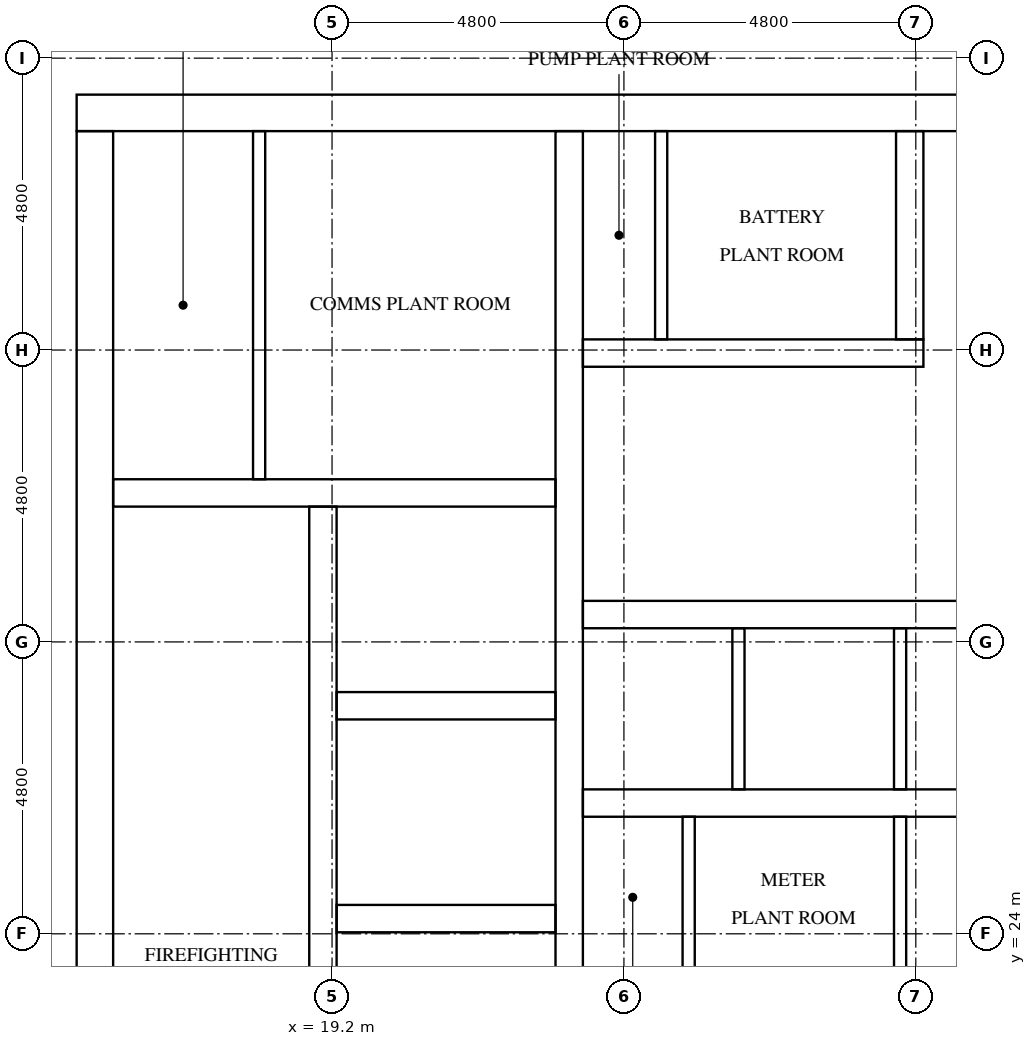
"""IFC4 building model, lengths in metres.
Left out: names, types, materials, properties, quantities, classifications, styles, units other than length and angle.
Written with IfcOpenShell. Run it as: python <this file> out.ifc"""

import sys

from ifc_helpers import new_model, si_unit, direction, frame, frame_2d, origin, place, context, subcontext, project, spatial, rectangle, extrude, element, fill, save


model = new_model("IFC4")
c1 = context("Model", 3, precision=1e-05, world=origin(), true_north=direction((0.0, 1.0)))
c2 = subcontext(c1, "Body", "Model", "MODEL_VIEW")
j1 = project(units=[si_unit("LENGTHUNIT", "METRE"), si_unit("PLANEANGLEUNIT", "RADIAN")], contexts=[c1])
p1 = place(None, origin())
s1 = spatial("IfcSite", under=j1, at=p1, CompositionType="ELEMENT")
p2 = place(p1, origin())
s2 = spatial("IfcBuilding", under=s1, at=p2, CompositionType="ELEMENT")
p3 = place(p2, frame((0.0, 0.0, 233.3)))
s3 = spatial("IfcBuildingStorey", under=s2, at=p3, CompositionType="ELEMENT", Elevation=233.3)
p4 = place(p3, frame((15.0, 37.5, 0.0), z_axis=(0.0, 0.0, 1.0), x_axis=(1.0, 0.0, 0.0)))
e1 = element("IfcWall", 1, at=p4, inside=s3, PredefinedType="SHEAR", context=c2, shape_type="SweptSolid", body=[
    extrude(rectangle(XDim=32.4, YDim=0.6, at=frame_2d((16.2, 0.0))), origin(), (0.0, 0.0, 1.0), 5.1),
])
p5 = place(p4, frame((15.3, 0.0, 0.0)))
e2 = element("IfcOpeningElement", 2, at=p5, cuts=e1, PredefinedType="OPENING", context=c2, shape_type="SweptSolid", body=[
    extrude(rectangle(XDim=1.8, YDim=2.1, at=frame_2d((0.9, 1.05))), frame((0.0, 0.31, 0.0), z_axis=(0.0, -1.0, 0.0), x_axis=(1.0, 0.0, 0.0)), (0.0, 0.0, 1.0), 0.62),
])
p6 = place(p4, frame((1.25, 0.0, 0.0)))
e3 = element("IfcOpeningElement", 3, at=p6, cuts=e1, PredefinedType="OPENING", context=c2, shape_type="SweptSolid", body=[
    extrude(rectangle(XDim=1.0, YDim=2.1, at=frame_2d((0.5, 1.05))), frame((0.0, 0.31, 0.0), z_axis=(0.0, -1.0, 0.0), x_axis=(1.0, 0.0, 0.0)), (0.0, 0.0, 1.0), 0.62),
])
p7 = place(p4, frame((4.988, 0.0, 0.0)))
e4 = element("IfcOpeningElement", 4, at=p7, cuts=e1, PredefinedType="OPENING", context=c2, shape_type="SweptSolid", body=[
    extrude(rectangle(XDim=1.0, YDim=2.1, at=frame_2d((0.5, 1.05))), frame((0.0, 0.31, 0.0), z_axis=(0.0, -1.0, 0.0), x_axis=(1.0, 0.0, 0.0)), (0.0, 0.0, 1.0), 0.62),
])
p8 = place(p3, frame((15.3, 15.6, 0.0), z_axis=(0.0, 0.0, 1.0), x_axis=(0.0, 1.0, 0.0)))
e5 = element("IfcWall", 5, at=p8, inside=s3, PredefinedType="SHEAR", context=c2, shape_type="SweptSolid", body=[
    extrude(rectangle(XDim=21.6, YDim=0.6, at=frame_2d((10.8, 0.0))), origin(), (0.0, 0.0, 1.0), 5.1),
])
p9 = place(p8, frame((5.16, 0.0, 0.0)))
e6 = element("IfcOpeningElement", 6, at=p9, cuts=e5, PredefinedType="OPENING", context=c2, shape_type="SweptSolid", body=[
    extrude(rectangle(XDim=1.2, YDim=2.1, at=frame_2d((0.6, 1.05))), frame((0.0, 0.31, 0.0), z_axis=(0.0, -1.0, 0.0), x_axis=(1.0, 0.0, 0.0)), (0.0, 0.0, 1.0), 0.62),
])
p10 = place(p3, frame((19.05, 15.6, 0.0), z_axis=(0.0, 0.0, 1.0), x_axis=(0.0, 1.0, 0.0)))
e7 = element("IfcWall", 7, at=p10, inside=s3, PredefinedType="SHEAR", context=c2, shape_type="SweptSolid", body=[
    extrude(rectangle(XDim=15.425, YDim=0.45, at=frame_2d((7.712, 0.0))), origin(), (0.0, 0.0, 1.0), 5.1),
])
p11 = place(p10, frame((9.85, 0.0, 0.0)))
e8 = element("IfcOpeningElement", 8, at=p11, cuts=e7, PredefinedType="OPENING", context=c2, shape_type="SweptSolid", body=[
    extrude(rectangle(XDim=1.1, YDim=2.1, at=frame_2d((0.55, 1.05))), frame((0.0, 0.235, 0.0), z_axis=(0.0, -1.0, 0.0), x_axis=(1.0, 0.0, 0.0)), (0.0, 0.0, 1.0), 0.47),
])
p12 = place(p10, frame((13.35, 0.0, 0.0)))
e9 = element("IfcOpeningElement", 9, at=p12, cuts=e7, PredefinedType="OPENING", context=c2, shape_type="SweptSolid", body=[
    extrude(rectangle(XDim=1.1, YDim=2.1, at=frame_2d((0.55, 1.05))), frame((0.0, 0.235, 0.0), z_axis=(0.0, -1.0, 0.0), x_axis=(1.0, 0.0, 0.0)), (0.0, 0.0, 1.0), 0.47),
])
p13 = place(p10, frame((0.6, 0.0, 0.0)))
e10 = element("IfcOpeningElement", 10, at=p13, cuts=e7, PredefinedType="OPENING", context=c2, shape_type="SweptSolid", body=[
    extrude(rectangle(XDim=1.2, YDim=2.1, at=frame_2d((0.6, 1.05))), frame((0.0, 0.235, 0.0), z_axis=(0.0, -1.0, 0.0), x_axis=(1.0, 0.0, 0.0)), (0.0, 0.0, 1.0), 0.47),
])
p14 = place(p3, frame((23.1, 15.6, 0.0), z_axis=(0.0, 0.0, 1.0), x_axis=(0.0, 1.0, 0.0)))
e11 = element("IfcWall", 11, at=p14, inside=s3, PredefinedType="SHEAR", context=c2, shape_type="SweptSolid", body=[
    extrude(rectangle(XDim=21.6, YDim=0.45, at=frame_2d((10.8, 0.0))), origin(), (0.0, 0.0, 1.0), 5.1),
])
for number, where, z_axis, x_axis in (
    (12, (19.275, 24.25, 0.0), (0.0, 0.0, 1.0), (1.0, 0.0, 0.0)),
    (13, (19.275, 27.75, 0.0), (0.0, 0.0, 1.0), (1.0, 0.0, 0.0)),
):
    element("IfcWall", number, at=place(p3, frame(where, z_axis=z_axis, x_axis=x_axis)), inside=s3, PredefinedType="SHEAR", context=c2, shape_type="SweptSolid", body=[
        extrude(rectangle(XDim=3.6, YDim=0.45, at=frame_2d((1.8, 0.0))), origin(), (0.0, 0.0, 1.0), 5.1),
    ])
p15 = place(p3, frame((15.6, 31.25, 0.0), z_axis=(0.0, 0.0, 1.0), x_axis=(1.0, 0.0, 0.0)))
e14 = element("IfcWall", 14, at=p15, inside=s3, PredefinedType="SHEAR", context=c2, shape_type="SweptSolid", body=[
    extrude(rectangle(XDim=7.275, YDim=0.45, at=frame_2d((3.637, 0.0))), origin(), (0.0, 0.0, 1.0), 5.1),
])
p16 = place(p3, frame((23.325, 26.15, 0.0), z_axis=(0.0, 0.0, 1.0), x_axis=(1.0, 0.0, 0.0)))
e15 = element("IfcWall", 15, at=p16, inside=s3, PredefinedType="SHEAR", context=c2, shape_type="SweptSolid", body=[
    extrude(rectangle(XDim=15.75, YDim=0.45, at=frame_2d((7.875, 0.0))), origin(), (0.0, 0.0, 1.0), 5.1),
])
p17 = place(p3, frame((23.325, 29.25, 0.0), z_axis=(0.0, 0.0, 1.0), x_axis=(1.0, 0.0, 0.0)))
e16 = element("IfcWall", 16, at=p17, inside=s3, PredefinedType="SHEAR", context=c2, shape_type="SweptSolid", body=[
    extrude(rectangle(XDim=15.75, YDim=0.45, at=frame_2d((7.875, 0.0))), origin(), (0.0, 0.0, 1.0), 5.1),
])
p18 = place(p17, frame((0.679, 0.0, 0.0)))
e17 = element("IfcOpeningElement", 17, at=p18, cuts=e16, PredefinedType="OPENING", context=c2, shape_type="SweptSolid", body=[
    extrude(rectangle(XDim=1.1, YDim=2.1, at=frame_2d((0.55, 1.05))), frame((0.0, 0.235, 0.0), z_axis=(0.0, -1.0, 0.0), x_axis=(1.0, 0.0, 0.0)), (0.0, 0.0, 1.0), 0.47),
])
p19 = place(p17, frame((3.337, 0.0, 0.0)))
e18 = element("IfcOpeningElement", 18, at=p19, cuts=e16, PredefinedType="OPENING", context=c2, shape_type="SweptSolid", body=[
    extrude(rectangle(XDim=1.1, YDim=2.1, at=frame_2d((0.55, 1.05))), frame((0.0, 0.235, 0.0), z_axis=(0.0, -1.0, 0.0), x_axis=(1.0, 0.0, 0.0)), (0.0, 0.0, 1.0), 0.47),
])
p20 = place(p17, frame((5.996, 0.0, 0.0)))
e19 = element("IfcOpeningElement", 19, at=p20, cuts=e16, PredefinedType="OPENING", context=c2, shape_type="SweptSolid", body=[
    extrude(rectangle(XDim=1.1, YDim=2.1, at=frame_2d((0.55, 1.05))), frame((0.0, 0.235, 0.0), z_axis=(0.0, -1.0, 0.0), x_axis=(1.0, 0.0, 0.0)), (0.0, 0.0, 1.0), 0.47),
])
p21 = place(p17, frame((8.654, 0.0, 0.0)))
e20 = element("IfcOpeningElement", 20, at=p21, cuts=e16, PredefinedType="OPENING", context=c2, shape_type="SweptSolid", body=[
    extrude(rectangle(XDim=1.1, YDim=2.1, at=frame_2d((0.55, 1.05))), frame((0.0, 0.235, 0.0), z_axis=(0.0, -1.0, 0.0), x_axis=(1.0, 0.0, 0.0)), (0.0, 0.0, 1.0), 0.47),
])
p22 = place(p17, frame((11.312, 0.0, 0.0)))
e21 = element("IfcOpeningElement", 21, at=p22, cuts=e16, PredefinedType="OPENING", context=c2, shape_type="SweptSolid", body=[
    extrude(rectangle(XDim=1.1, YDim=2.1, at=frame_2d((0.55, 1.05))), frame((0.0, 0.235, 0.0), z_axis=(0.0, -1.0, 0.0), x_axis=(1.0, 0.0, 0.0)), (0.0, 0.0, 1.0), 0.47),
])
p23 = place(p17, frame((13.971, 0.0, 0.0)))
e22 = element("IfcOpeningElement", 22, at=p23, cuts=e16, PredefinedType="OPENING", context=c2, shape_type="SweptSolid", body=[
    extrude(rectangle(XDim=1.1, YDim=2.1, at=frame_2d((0.55, 1.05))), frame((0.0, 0.235, 0.0), z_axis=(0.0, -1.0, 0.0), x_axis=(1.0, 0.0, 0.0)), (0.0, 0.0, 1.0), 0.47),
])
p24 = place(p3, frame((23.325, 33.55, 0.0), z_axis=(0.0, 0.0, 1.0), x_axis=(1.0, 0.0, 0.0)))
e23 = element("IfcWall", 23, at=p24, inside=s3, PredefinedType="SHEAR", context=c2, shape_type="SweptSolid", body=[
    extrude(rectangle(XDim=5.6, YDim=0.45, at=frame_2d((2.8, 0.0))), origin(), (0.0, 0.0, 1.0), 5.1),
])
p25 = place(p24, frame((0.094, 0.0, 0.0)))
e24 = element("IfcOpeningElement", 24, at=p25, cuts=e23, PredefinedType="OPENING", context=c2, shape_type="SweptSolid", body=[
    extrude(rectangle(XDim=1.0, YDim=2.1, at=frame_2d((0.5, 1.05))), frame((0.0, 0.235, 0.0), z_axis=(0.0, -1.0, 0.0), x_axis=(1.0, 0.0, 0.0)), (0.0, 0.0, 1.0), 0.47),
])
p26 = place(p24, frame((2.769, 0.0, 0.0)))
e25 = element("IfcOpeningElement", 25, at=p26, cuts=e23, PredefinedType="OPENING", context=c2, shape_type="SweptSolid", body=[
    extrude(rectangle(XDim=1.0, YDim=2.1, at=frame_2d((0.5, 1.05))), frame((0.0, 0.235, 0.0), z_axis=(0.0, -1.0, 0.0), x_axis=(1.0, 0.0, 0.0)), (0.0, 0.0, 1.0), 0.47),
])
p27 = place(p3, frame((28.7, 33.775, 0.0), z_axis=(0.0, 0.0, 1.0), x_axis=(0.0, 1.0, 0.0)))
e26 = element("IfcWall", 26, at=p27, inside=s3, PredefinedType="SHEAR", context=c2, shape_type="SweptSolid", body=[
    extrude(rectangle(XDim=3.425, YDim=0.45, at=frame_2d((1.712, 0.0))), origin(), (0.0, 0.0, 1.0), 5.1),
])
p28 = place(p3, frame((25.883, 26.375, 0.0), z_axis=(0.0, 0.0, 1.0), x_axis=(0.0, 1.0, 0.0)))
e27 = element("IfcWall", 27, at=p28, inside=s3, PredefinedType="SOLIDWALL", context=c2, shape_type="SweptSolid", body=[
    extrude(rectangle(XDim=2.65, YDim=0.2, at=frame_2d((1.325, 0.0))), origin(), (0.0, 0.0, 1.0), 5.1),
])
p29 = place(p3, frame((28.542, 23.275, 0.0), z_axis=(0.0, 0.0, 1.0), x_axis=(0.0, 1.0, 0.0)))
e28 = element("IfcWall", 28, at=p29, inside=s3, PredefinedType="SOLIDWALL", context=c2, shape_type="SweptSolid", body=[
    extrude(rectangle(XDim=2.65, YDim=0.2, at=frame_2d((1.325, 0.0))), origin(), (0.0, 0.0, 1.0), 5.1),
])
p30 = place(p3, frame((28.542, 26.375, 0.0), z_axis=(0.0, 0.0, 1.0), x_axis=(0.0, 1.0, 0.0)))
e29 = element("IfcWall", 29, at=p30, inside=s3, PredefinedType="SOLIDWALL", context=c2, shape_type="SweptSolid", body=[
    extrude(rectangle(XDim=2.65, YDim=0.2, at=frame_2d((1.325, 0.0))), origin(), (0.0, 0.0, 1.0), 5.1),
])
p31 = place(p3, frame((18.001, 31.475, 0.0), z_axis=(0.0, 0.0, 1.0), x_axis=(0.0, 1.0, 0.0)))
e30 = element("IfcWall", 30, at=p31, inside=s3, PredefinedType="PARTITIONING", context=c2, shape_type="SweptSolid", body=[
    extrude(rectangle(XDim=5.725, YDim=0.2, at=frame_2d((2.862, 0.0))), origin(), (0.0, 0.0, 1.0), 5.1),
])
p32 = place(p3, frame((25.065, 23.275, 0.0), z_axis=(0.0, 0.0, 1.0), x_axis=(0.0, 1.0, 0.0)))
e31 = element("IfcWall", 31, at=p32, inside=s3, PredefinedType="PARTITIONING", context=c2, shape_type="SweptSolid", body=[
    extrude(rectangle(XDim=2.65, YDim=0.2, at=frame_2d((1.325, 0.0))), origin(), (0.0, 0.0, 1.0), 5.1),
])
p33 = place(p3, frame((24.613, 33.775, 0.0), z_axis=(0.0, 0.0, 1.0), x_axis=(0.0, 1.0, 0.0)))
e32 = element("IfcWall", 32, at=p33, inside=s3, PredefinedType="PARTITIONING", context=c2, shape_type="SweptSolid", body=[
    extrude(rectangle(XDim=3.425, YDim=0.2, at=frame_2d((1.712, 0.0))), origin(), (0.0, 0.0, 1.0), 5.1),
])
p34 = place(p18, origin())
e33 = element("IfcDoor", 33, at=p34, inside=s3, OperationType="DOUBLE_DOOR_SLIDING", PredefinedType="DOOR", context=c2, shape_type="SweptSolid", body=[
    extrude(rectangle(XDim=1.1, YDim=2.1, at=frame_2d((0.55, 1.05))), frame((0.0, 0.025, 0.0), z_axis=(0.0, -1.0, 0.0), x_axis=(1.0, 0.0, 0.0)), (0.0, 0.0, 1.0), 0.05),
])
fill(e17, e33)
p35 = place(p19, origin())
e34 = element("IfcDoor", 34, at=p35, inside=s3, OperationType="DOUBLE_DOOR_SLIDING", PredefinedType="DOOR", context=c2, shape_type="SweptSolid", body=[
    extrude(rectangle(XDim=1.1, YDim=2.1, at=frame_2d((0.55, 1.05))), frame((0.0, 0.025, 0.0), z_axis=(0.0, -1.0, 0.0), x_axis=(1.0, 0.0, 0.0)), (0.0, 0.0, 1.0), 0.05),
])
fill(e18, e34)
p36 = place(p20, origin())
e35 = element("IfcDoor", 35, at=p36, inside=s3, OperationType="DOUBLE_DOOR_SLIDING", PredefinedType="DOOR", context=c2, shape_type="SweptSolid", body=[
    extrude(rectangle(XDim=1.1, YDim=2.1, at=frame_2d((0.55, 1.05))), frame((0.0, 0.025, 0.0), z_axis=(0.0, -1.0, 0.0), x_axis=(1.0, 0.0, 0.0)), (0.0, 0.0, 1.0), 0.05),
])
fill(e19, e35)
p37 = place(p11, origin())
e36 = element("IfcDoor", 36, at=p37, inside=s3, OperationType="DOUBLE_DOOR_SLIDING", PredefinedType="DOOR", context=c2, shape_type="SweptSolid", body=[
    extrude(rectangle(XDim=1.1, YDim=2.1, at=frame_2d((0.55, 1.05))), frame((0.0, 0.025, 0.0), z_axis=(0.0, -1.0, 0.0), x_axis=(1.0, 0.0, 0.0)), (0.0, 0.0, 1.0), 0.05),
])
fill(e8, e36)
p38 = place(p12, origin())
e37 = element("IfcDoor", 37, at=p38, inside=s3, OperationType="DOUBLE_DOOR_SLIDING", PredefinedType="DOOR", context=c2, shape_type="SweptSolid", body=[
    extrude(rectangle(XDim=1.1, YDim=2.1, at=frame_2d((0.55, 1.05))), frame((0.0, 0.025, 0.0), z_axis=(0.0, -1.0, 0.0), x_axis=(1.0, 0.0, 0.0)), (0.0, 0.0, 1.0), 0.05),
])
fill(e9, e37)
p39 = place(p6, origin())
e38 = element("IfcDoor", 38, at=p39, inside=s3, OperationType="SINGLE_SWING_RIGHT", PredefinedType="DOOR", context=c2, shape_type="SweptSolid", body=[
    extrude(rectangle(XDim=1.0, YDim=2.1, at=frame_2d((0.5, 1.05))), frame((0.0, 0.025, 0.0), z_axis=(0.0, -1.0, 0.0), x_axis=(1.0, 0.0, 0.0)), (0.0, 0.0, 1.0), 0.05),
])
fill(e3, e38)
p40 = place(p7, origin())
e39 = element("IfcDoor", 39, at=p40, inside=s3, OperationType="SINGLE_SWING_LEFT", PredefinedType="DOOR", context=c2, shape_type="SweptSolid", body=[
    extrude(rectangle(XDim=1.0, YDim=2.1, at=frame_2d((0.5, 1.05))), frame((0.0, 0.025, 0.0), z_axis=(0.0, -1.0, 0.0), x_axis=(1.0, 0.0, 0.0)), (0.0, 0.0, 1.0), 0.05),
])
fill(e4, e39)
p41 = place(p25, frame((1.0, 0.0, 0.0), z_axis=(0.0, 0.0, 1.0), x_axis=(-1.0, 0.0, 0.0)))
e40 = element("IfcDoor", 40, at=p41, inside=s3, OperationType="SINGLE_SWING_RIGHT", PredefinedType="DOOR", context=c2, shape_type="SweptSolid", body=[
    extrude(rectangle(XDim=1.0, YDim=2.1, at=frame_2d((0.5, 1.05))), frame((0.0, 0.025, 0.0), z_axis=(0.0, -1.0, 0.0), x_axis=(1.0, 0.0, 0.0)), (0.0, 0.0, 1.0), 0.05),
])
fill(e24, e40)
p42 = place(p26, frame((1.0, 0.0, 0.0), z_axis=(0.0, 0.0, 1.0), x_axis=(-1.0, 0.0, 0.0)))
e41 = element("IfcDoor", 41, at=p42, inside=s3, OperationType="SINGLE_SWING_LEFT", PredefinedType="DOOR", context=c2, shape_type="SweptSolid", body=[
    extrude(rectangle(XDim=1.0, YDim=2.1, at=frame_2d((0.5, 1.05))), frame((0.0, 0.025, 0.0), z_axis=(0.0, -1.0, 0.0), x_axis=(1.0, 0.0, 0.0)), (0.0, 0.0, 1.0), 0.05),
])
fill(e25, e41)
save(model, sys.argv[1])
